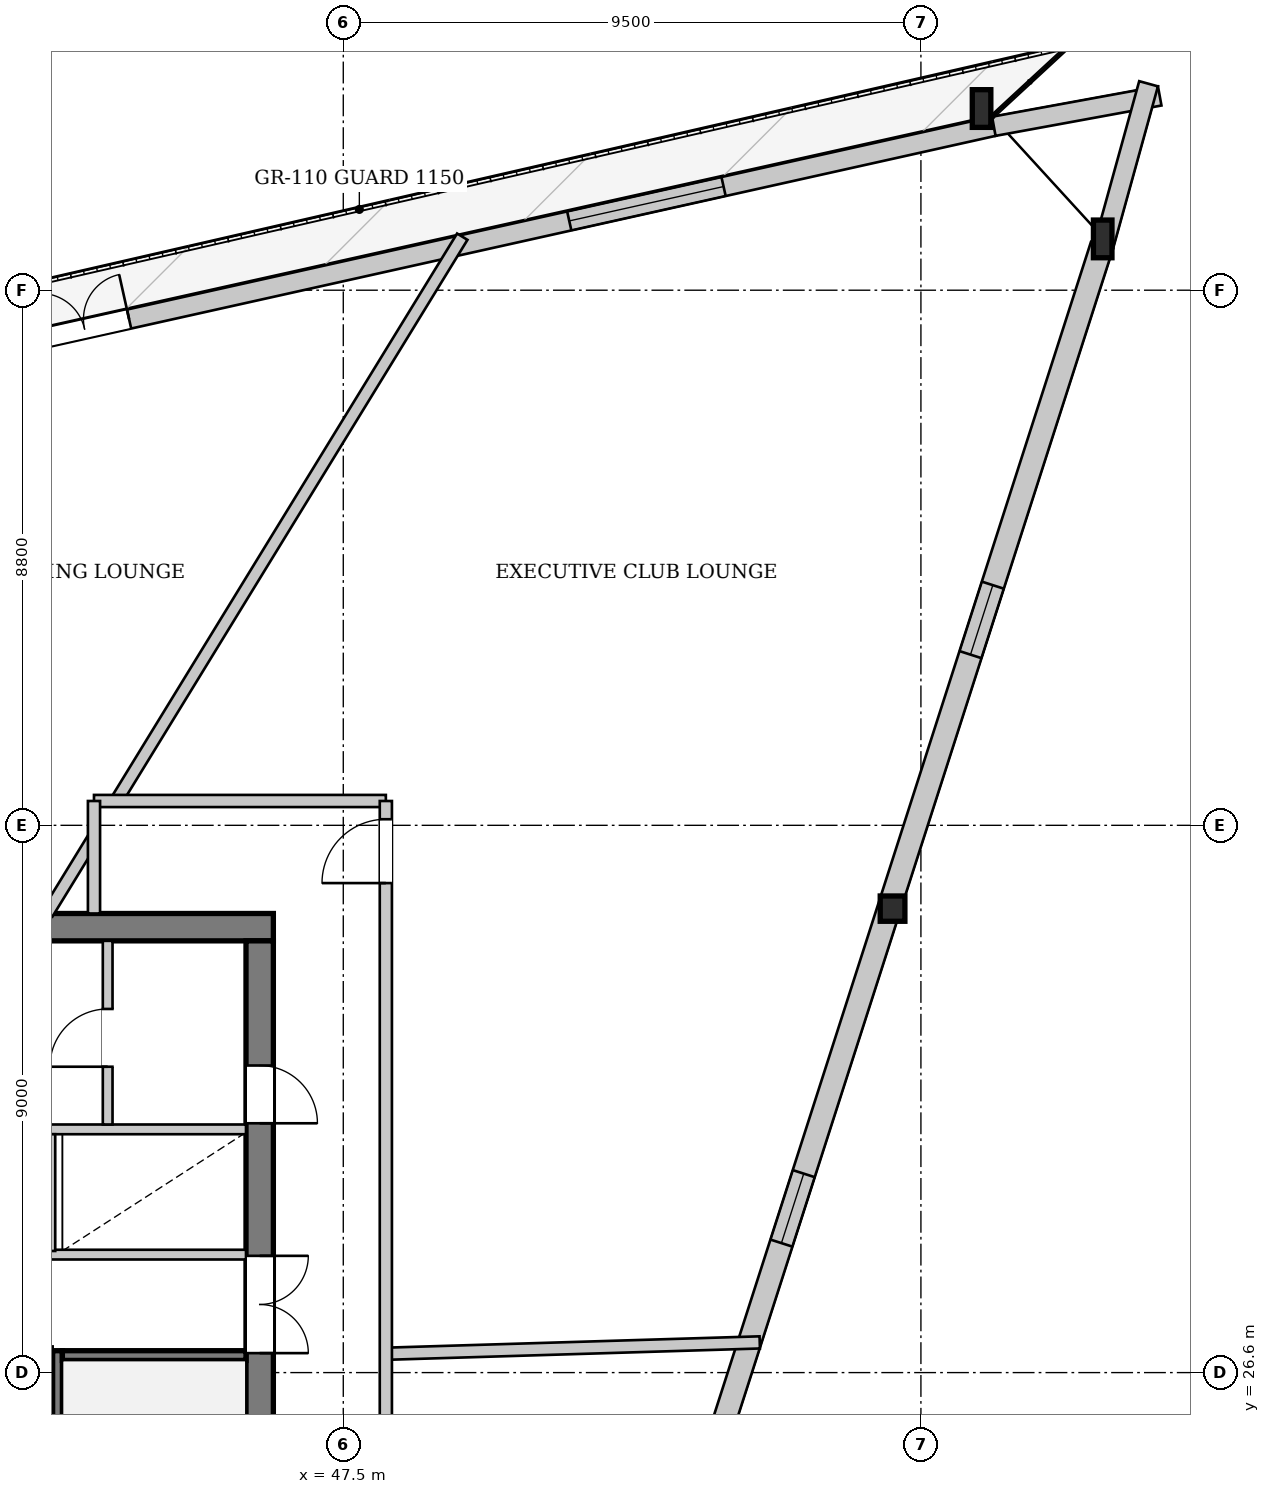
"""IFC4 building model, lengths in metres.
Left out: names, types, materials, properties, quantities, classifications, styles, units other than length and angle.
Written with IfcOpenShell. Run it as: python <this file> out.ifc"""

import sys

from ifc_helpers import new_model, si_unit, direction, frame, frame_2d, origin, origin_2d, place, context, subcontext, project, spatial, rectangle, i_section, extrude, source, transform, mapped, element, fill, save


model = new_model("IFC4")
c1 = context("Model", 3, precision=1e-05, world=origin(), true_north=direction((0.0, 1.0)))
c2 = subcontext(c1, "Body", "Model", "MODEL_VIEW")
j1 = project(units=[si_unit("LENGTHUNIT", "METRE"), si_unit("PLANEANGLEUNIT", "RADIAN")], contexts=[c1])
p1 = place(None, origin())
s1 = spatial("IfcSite", under=j1, at=p1, CompositionType="ELEMENT")
p2 = place(p1, origin())
s2 = spatial("IfcBuilding", under=s1, at=p2, CompositionType="ELEMENT")
p3 = place(p2, frame((0.0, 0.0, 209.6)))
s3 = spatial("IfcBuildingStorey", under=s2, at=p3, CompositionType="ELEMENT", Elevation=209.6)
m1 = source(origin(), c2, "Body", "SweptSolid", [
    extrude(i_section(OverallWidth=0.305, OverallDepth=0.62, WebThickness=0.021, FlangeThickness=0.04, at=origin_2d()), origin(), (0.0, 0.0, 1.0), 3.418),
])
p4 = place(p3, frame((60.159, 45.079, 0.0), z_axis=(-0.098864511312, 0.096292891076, 0.990430960507), x_axis=(-0.69772854898, -0.716362249101, 0.0)))
e1 = element("IfcColumn", 1, at=p4, inside=s3, PredefinedType="COLUMN", context=c2, shape_type="MappedRepresentation", body=[
    mapped(m1, transform((0.0, 0.0, 0.0), x_axis=(1.0, 0.0, 0.0), y_axis=(0.0, 1.0, 0.0), z_axis=(0.0, 0.0, 1.0), scale=1.0)),
])
m2 = source(origin(), c2, "Body", "SweptSolid", [
    extrude(i_section(OverallWidth=0.305, OverallDepth=0.62, WebThickness=0.021, FlangeThickness=0.04, at=origin_2d()), origin(), (0.0, 0.0, 1.0), 3.413),
])
p5 = place(p3, frame((58.17, 47.253, 0.0), z_axis=(-0.101281359539, 0.07903665416, 0.991713312157), x_axis=(-0.615211782312, -0.78836188575, 0.0)))
e2 = element("IfcColumn", 2, at=p5, inside=s3, PredefinedType="COLUMN", context=c2, shape_type="MappedRepresentation", body=[
    mapped(m2, transform((0.0, 0.0, 0.0), x_axis=(1.0, 0.0, 0.0), y_axis=(0.0, 1.0, 0.0), z_axis=(0.0, 0.0, 1.0), scale=1.0)),
])
m3 = source(origin(), c2, "Body", "SweptSolid", [
    extrude(i_section(OverallWidth=0.406, OverallDepth=0.416, WebThickness=0.027, FlangeThickness=0.042, at=origin_2d()), origin(), (0.0, 0.0, 1.0), 3.403),
])
p6 = place(p3, frame((56.625, 34.082, 0.0), z_axis=(-0.053880341029, 0.087098181103, 0.994741582372), x_axis=(-0.85042932519, -0.526089310723, 0.0)))
e3 = element("IfcColumn", 3, at=p6, inside=s3, PredefinedType="COLUMN", context=c2, shape_type="MappedRepresentation", body=[
    mapped(m3, transform((0.0, 0.0, 0.0), x_axis=(1.0, 0.0, 0.0), y_axis=(0.0, 1.0, 0.0), z_axis=(0.0, 0.0, 1.0), scale=1.0)),
])
p7 = place(p3, frame((36.205, 42.193, 0.0), z_axis=(0.0, 0.0, 1.0), x_axis=(0.976051796761, 0.217538249599, 0.0)))
e4 = element("IfcWall", 4, at=p7, inside=s3, PredefinedType="SOLIDWALL", context=c2, shape_type="SweptSolid", body=[
    extrude(rectangle(XDim=22.54, YDim=0.32, at=frame_2d((11.27, 0.0))), origin(), (0.0, 0.0, 1.0), 2.822),
])
p8 = place(p7, frame((6.463, 0.0, 0.0)))
e5 = element("IfcOpeningElement", 5, at=p8, cuts=e4, PredefinedType="OPENING", context=c2, shape_type="SweptSolid", body=[
    extrude(rectangle(XDim=1.5, YDim=2.3, at=frame_2d((0.75, 1.15))), frame((0.0, 0.17, 0.0), z_axis=(0.0, -1.0, 0.0), x_axis=(1.0, 0.0, 0.0)), (0.0, 0.0, 1.0), 0.34),
])
p9 = place(p7, frame((15.38, 0.0, 0.352)))
e6 = element("IfcOpeningElement", 6, at=p9, cuts=e4, PredefinedType="OPENING", context=c2, shape_type="SweptSolid", body=[
    extrude(rectangle(XDim=2.6, YDim=2.35, at=frame_2d((1.3, 1.175))), frame((0.0, 0.17, 0.0), z_axis=(0.0, -1.0, 0.0), x_axis=(1.0, 0.0, 0.0)), (0.0, 0.0, 1.0), 0.34),
])
for number, where, z_axis, x_axis in (
    (7, (58.199, 47.096, 0.0), (0.0, 0.0, 1.0), (0.984, 0.18, 0.0)),
    (8, (60.744, 47.795, 0.0), (0.0, 0.0, 1.0), (-0.267, -0.964, 0.0)),
):
    element("IfcWall", number, at=place(p3, frame(where, z_axis=z_axis, x_axis=x_axis)), inside=s3, PredefinedType="SOLIDWALL", context=c2, shape_type="SweptSolid", body=[
        extrude(rectangle(XDim=2.774, YDim=0.32, at=frame_2d((1.387, 0.0))), origin(), (0.0, 0.0, 1.0), 2.822),
    ])
p10 = place(p3, frame((59.978, 45.137, 0.0), z_axis=(0.0, 0.0, 1.0), x_axis=(-0.305908606636, -0.95206088271, 0.0)))
e9 = element("IfcWall", 9, at=p10, inside=s3, PredefinedType="SOLIDWALL", context=c2, shape_type="SweptSolid", body=[
    extrude(rectangle(XDim=23.102, YDim=0.38, at=frame_2d((11.551, 0.0))), origin(), (0.0, 0.0, 1.0), 2.822),
])
p11 = place(p10, frame((5.869, 0.0, 0.65)))
e10 = element("IfcOpeningElement", 10, at=p11, cuts=e9, PredefinedType="OPENING", context=c2, shape_type="SweptSolid", body=[
    extrude(rectangle(XDim=1.2, YDim=1.5, at=frame_2d((0.6, 0.75))), frame((0.0, 0.2, 0.0), z_axis=(0.0, -1.0, 0.0), x_axis=(1.0, 0.0, 0.0)), (0.0, 0.0, 1.0), 0.4),
])
p12 = place(p10, frame((16.034, 0.0, 0.65)))
e11 = element("IfcOpeningElement", 11, at=p12, cuts=e9, PredefinedType="OPENING", context=c2, shape_type="SweptSolid", body=[
    extrude(rectangle(XDim=1.2, YDim=1.5, at=frame_2d((0.6, 0.75))), frame((0.0, 0.2, 0.0), z_axis=(0.0, -1.0, 0.0), x_axis=(1.0, 0.0, 0.0)), (0.0, 0.0, 1.0), 0.4),
])
p13 = place(p3, frame((29.65, 33.925, 0.0), z_axis=(0.0, 0.0, 1.0), x_axis=(1.0, 0.0, 0.0)))
e12 = element("IfcWall", 12, at=p13, inside=s3, PredefinedType="SHEAR", context=c2, shape_type="SweptSolid", body=[
    extrude(rectangle(XDim=16.7, YDim=0.45, at=frame_2d((8.35, 0.0))), origin(), (0.0, 0.0, 1.0), 3.33),
])
p14 = place(p13, frame((1.45, 0.0, 0.0)))
e13 = element("IfcOpeningElement", 13, at=p14, cuts=e12, PredefinedType="OPENING", context=c2, shape_type="SweptSolid", body=[
    extrude(rectangle(XDim=0.95, YDim=2.1, at=frame_2d((0.475, 1.05))), frame((0.0, 0.235, 0.0), z_axis=(0.0, -1.0, 0.0), x_axis=(1.0, 0.0, 0.0)), (0.0, 0.0, 1.0), 0.47),
])
p15 = place(p13, frame((3.83, 0.0, 0.0)))
e14 = element("IfcOpeningElement", 14, at=p15, cuts=e12, PredefinedType="OPENING", context=c2, shape_type="SweptSolid", body=[
    extrude(rectangle(XDim=1.32, YDim=2.2, at=frame_2d((0.66, 1.1))), frame((0.0, 0.235, 0.0), z_axis=(0.0, -1.0, 0.0), x_axis=(1.0, 0.0, 0.0)), (0.0, 0.0, 1.0), 0.47),
])
p16 = place(p3, frame((46.125, 33.7, 0.0), z_axis=(0.0, 0.0, 1.0), x_axis=(0.0, -1.0, 0.0)))
e15 = element("IfcWall", 15, at=p16, inside=s3, PredefinedType="SHEAR", context=c2, shape_type="SweptSolid", body=[
    extrude(rectangle(XDim=14.2, YDim=0.45, at=frame_2d((7.1, 0.0))), origin(), (0.0, 0.0, 1.0), 3.33),
])
p17 = place(p16, frame((5.18, 0.0, 0.0)))
e16 = element("IfcOpeningElement", 16, at=p17, cuts=e15, PredefinedType="OPENING", context=c2, shape_type="SweptSolid", body=[
    extrude(rectangle(XDim=1.6, YDim=2.2, at=frame_2d((0.8, 1.1))), frame((0.0, 0.235, 0.0), z_axis=(0.0, -1.0, 0.0), x_axis=(1.0, 0.0, 0.0)), (0.0, 0.0, 1.0), 0.47),
])
p18 = place(p16, frame((2.05, 0.0, 0.0)))
e17 = element("IfcOpeningElement", 17, at=p18, cuts=e15, PredefinedType="OPENING", context=c2, shape_type="SweptSolid", body=[
    extrude(rectangle(XDim=0.95, YDim=2.1, at=frame_2d((0.475, 1.05))), frame((0.0, 0.235, 0.0), z_axis=(0.0, -1.0, 0.0), x_axis=(1.0, 0.0, 0.0)), (0.0, 0.0, 1.0), 0.47),
])
p19 = place(p3, frame((42.8, 26.96, 0.0), z_axis=(0.0, 0.0, 1.0), x_axis=(0.0, -1.0, 0.0)))
e18 = element("IfcWall", 18, at=p19, inside=s3, PredefinedType="PARTITIONING", context=c2, shape_type="SweptSolid", body=[
    extrude(rectangle(XDim=7.46, YDim=0.16, at=frame_2d((3.73, 0.0))), origin(), (0.0, 0.0, 1.0), 3.33),
])
p20 = place(p19, frame((6.06, 0.0, 0.0)))
e19 = element("IfcOpeningElement", 19, at=p20, cuts=e18, PredefinedType="OPENING", context=c2, shape_type="SweptSolid", body=[
    extrude(rectangle(XDim=1.32, YDim=2.2, at=frame_2d((0.66, 1.1))), frame((0.0, 0.09, 0.0), z_axis=(0.0, -1.0, 0.0), x_axis=(1.0, 0.0, 0.0)), (0.0, 0.0, 1.0), 0.18),
])
p21 = place(p3, frame((42.88, 26.88, 0.0), z_axis=(0.0, 0.0, 1.0), x_axis=(1.0, 0.0, 0.0)))
e20 = element("IfcWall", 20, at=p21, inside=s3, PredefinedType="PARTITIONING", context=c2, shape_type="SweptSolid", body=[
    extrude(rectangle(XDim=3.02, YDim=0.16, at=frame_2d((1.51, 0.0))), origin(), (0.0, 0.0, 1.0), 3.33),
])
p22 = place(p3, frame((33.28, 26.95, 0.0), z_axis=(0.0, 0.0, 1.0), x_axis=(1.0, 0.0, 0.0)))
e21 = element("IfcWall", 21, at=p22, inside=s3, PredefinedType="PARTITIONING", context=c2, shape_type="SweptSolid", body=[
    extrude(rectangle(XDim=9.44, YDim=0.16, at=frame_2d((4.72, 0.0))), origin(), (0.0, 0.0, 1.0), 3.33),
])
p23 = place(p22, frame((1.2, 0.0, 0.0)))
e22 = element("IfcOpeningElement", 22, at=p23, cuts=e21, PredefinedType="OPENING", context=c2, shape_type="SweptSolid", body=[
    extrude(rectangle(XDim=0.95, YDim=2.1, at=frame_2d((0.475, 1.05))), frame((0.0, 0.09, 0.0), z_axis=(0.0, -1.0, 0.0), x_axis=(1.0, 0.0, 0.0)), (0.0, 0.0, 1.0), 0.18),
])
p24 = place(p22, frame((4.65, 0.0, 0.0)))
e23 = element("IfcOpeningElement", 23, at=p24, cuts=e21, PredefinedType="OPENING", context=c2, shape_type="SweptSolid", body=[
    extrude(rectangle(XDim=0.95, YDim=2.1, at=frame_2d((0.475, 1.05))), frame((0.0, 0.09, 0.0), z_axis=(0.0, -1.0, 0.0), x_axis=(1.0, 0.0, 0.0)), (0.0, 0.0, 1.0), 0.18),
])
p25 = place(p22, frame((7.67, 0.0, 0.0)))
e24 = element("IfcOpeningElement", 24, at=p25, cuts=e21, PredefinedType="OPENING", context=c2, shape_type="SweptSolid", body=[
    extrude(rectangle(XDim=1.1, YDim=2.2, at=frame_2d((0.55, 1.1))), frame((0.0, 0.09, 0.0), z_axis=(0.0, -1.0, 0.0), x_axis=(1.0, 0.0, 0.0)), (0.0, 0.0, 1.0), 0.18),
])
p26 = place(p3, frame((33.28, 28.54, 0.0), z_axis=(0.0, 0.0, 1.0), x_axis=(1.0, 0.0, 0.0)))
e25 = element("IfcWall", 25, at=p26, inside=s3, PredefinedType="PARTITIONING", context=c2, shape_type="SweptSolid", body=[
    extrude(rectangle(XDim=12.62, YDim=0.16, at=frame_2d((6.31, 0.0))), origin(), (0.0, 0.0, 1.0), 3.33),
])
p27 = place(p26, frame((0.26, 0.0, 0.0)))
e26 = element("IfcOpeningElement", 26, at=p27, cuts=e25, PredefinedType="OPENING", context=c2, shape_type="SweptSolid", body=[
    extrude(rectangle(XDim=1.1, YDim=2.2, at=frame_2d((0.55, 1.1))), frame((0.0, 0.09, 0.0), z_axis=(0.0, -1.0, 0.0), x_axis=(1.0, 0.0, 0.0)), (0.0, 0.0, 1.0), 0.18),
])
p28 = place(p26, frame((2.01, 0.0, 0.0)))
e27 = element("IfcOpeningElement", 27, at=p28, cuts=e25, PredefinedType="OPENING", context=c2, shape_type="SweptSolid", body=[
    extrude(rectangle(XDim=1.1, YDim=2.2, at=frame_2d((0.55, 1.1))), frame((0.0, 0.09, 0.0), z_axis=(0.0, -1.0, 0.0), x_axis=(1.0, 0.0, 0.0)), (0.0, 0.0, 1.0), 0.18),
])
p29 = place(p26, frame((3.76, 0.0, 0.0)))
e28 = element("IfcOpeningElement", 28, at=p29, cuts=e25, PredefinedType="OPENING", context=c2, shape_type="SweptSolid", body=[
    extrude(rectangle(XDim=1.1, YDim=2.2, at=frame_2d((0.55, 1.1))), frame((0.0, 0.09, 0.0), z_axis=(0.0, -1.0, 0.0), x_axis=(1.0, 0.0, 0.0)), (0.0, 0.0, 1.0), 0.18),
])
p30 = place(p3, frame((40.72, 30.6, 0.0), z_axis=(0.0, 0.0, 1.0), x_axis=(1.0, 0.0, 0.0)))
e29 = element("IfcWall", 29, at=p30, inside=s3, PredefinedType="PARTITIONING", context=c2, shape_type="SweptSolid", body=[
    extrude(rectangle(XDim=5.18, YDim=0.16, at=frame_2d((2.59, 0.0))), origin(), (0.0, 0.0, 1.0), 3.33),
])
p31 = place(p3, frame((42.7, 28.6, 0.0), z_axis=(0.0, 0.0, 1.0), x_axis=(0.0, 1.0, 0.0)))
e30 = element("IfcWall", 30, at=p31, inside=s3, PredefinedType="PARTITIONING", context=c2, shape_type="SweptSolid", body=[
    extrude(rectangle(XDim=1.92, YDim=0.125, at=frame_2d((0.96, 0.0))), origin(), (0.0, 0.0, 1.0), 3.33),
])
p32 = place(p3, frame((43.625, 30.68, 0.0), z_axis=(0.0, 0.0, 1.0), x_axis=(0.0, 1.0, 0.0)))
e31 = element("IfcWall", 31, at=p32, inside=s3, PredefinedType="PARTITIONING", context=c2, shape_type="SweptSolid", body=[
    extrude(rectangle(XDim=3.02, YDim=0.16, at=frame_2d((1.51, 0.0))), origin(), (0.0, 0.0, 1.0), 3.33),
])
p33 = place(p32, frame((0.95, 0.0, 0.0)))
e32 = element("IfcOpeningElement", 32, at=p33, cuts=e31, PredefinedType="OPENING", context=c2, shape_type="SweptSolid", body=[
    extrude(rectangle(XDim=0.95, YDim=2.1, at=frame_2d((0.475, 1.05))), frame((0.0, 0.09, 0.0), z_axis=(0.0, -1.0, 0.0), x_axis=(1.0, 0.0, 0.0)), (0.0, 0.0, 1.0), 0.18),
])
p34 = place(p3, frame((48.2, 26.91, 0.0), z_axis=(0.0, 0.0, 1.0), x_axis=(0.999539065052, 0.030358811481, 0.0)))
e33 = element("IfcWall", 33, at=p34, inside=s3, PredefinedType="PARTITIONING", context=c2, shape_type="SweptSolid", body=[
    extrude(rectangle(XDim=6.152, YDim=0.2, at=frame_2d((3.076, 0.0))), origin(), (0.0, 0.0, 1.0), 3.33),
])
p35 = place(p3, frame((42.631, 34.15, 0.0), z_axis=(0.0, 0.0, 1.0), x_axis=(0.522717649011, 0.852505870603, 0.0)))
e34 = element("IfcWall", 34, at=p35, inside=s3, PredefinedType="PARTITIONING", context=c2, shape_type="SweptSolid", body=[
    extrude(rectangle(XDim=1.472, YDim=0.2, at=frame_2d((0.736, 0.0))), origin(), (0.0, 0.0, 1.0), 3.33),
])
p36 = place(p3, frame((43.765, 36.0, 0.0), z_axis=(0.0, 0.0, 1.0), x_axis=(0.522828119017, 0.852438125593, 0.0)))
e35 = element("IfcWall", 35, at=p36, inside=s3, PredefinedType="PARTITIONING", context=c2, shape_type="SweptSolid", body=[
    extrude(rectangle(XDim=10.887, YDim=0.2, at=frame_2d((5.443, 0.0))), origin(), (0.0, 0.0, 1.0), 3.33),
])
p37 = place(p3, frame((43.4, 36.0, 0.0), z_axis=(0.0, 0.0, 1.0), x_axis=(1.0, 0.0, 0.0)))
e36 = element("IfcWall", 36, at=p37, inside=s3, PredefinedType="PARTITIONING", context=c2, shape_type="SweptSolid", body=[
    extrude(rectangle(XDim=4.8, YDim=0.2, at=frame_2d((2.4, 0.0))), origin(), (0.0, 0.0, 1.0), 3.33),
])
p38 = place(p3, frame((43.4, 34.15, 0.0), z_axis=(0.0, 0.0, 1.0), x_axis=(0.0, 1.0, 0.0)))
e37 = element("IfcWall", 37, at=p38, inside=s3, PredefinedType="PARTITIONING", context=c2, shape_type="SweptSolid", body=[
    extrude(rectangle(XDim=1.85, YDim=0.2, at=frame_2d((0.925, 0.0))), origin(), (0.0, 0.0, 1.0), 3.33),
])
p39 = place(p3, frame((48.2, 17.2, 0.0), z_axis=(0.0, 0.0, 1.0), x_axis=(0.0, 1.0, 0.0)))
e38 = element("IfcWall", 38, at=p39, inside=s3, PredefinedType="PARTITIONING", context=c2, shape_type="SweptSolid", body=[
    extrude(rectangle(XDim=18.8, YDim=0.2, at=frame_2d((9.4, 0.0))), origin(), (0.0, 0.0, 1.0), 3.33),
])
p40 = place(p39, frame((17.45, 0.0, 0.0)))
e39 = element("IfcOpeningElement", 39, at=p40, cuts=e38, PredefinedType="OPENING", context=c2, shape_type="SweptSolid", body=[
    extrude(rectangle(XDim=1.05, YDim=2.2, at=frame_2d((0.525, 1.1))), frame((0.0, 0.11, 0.0), z_axis=(0.0, -1.0, 0.0), x_axis=(1.0, 0.0, 0.0)), (0.0, 0.0, 1.0), 0.22),
])
m4 = source(origin(), c2, "Body", "SweptSolid", [
    extrude(rectangle(XDim=1.5, YDim=2.3, at=frame_2d((0.75, 1.15))), frame((0.0, 0.025, 0.0), z_axis=(0.0, -1.0, 0.0), x_axis=(1.0, 0.0, 0.0)), (0.0, 0.0, 1.0), 0.05),
])
p41 = place(p8, origin())
e40 = element("IfcDoor", 40, at=p41, inside=s3, OperationType="DOUBLE_DOOR_SINGLE_SWING", PredefinedType="DOOR", context=c2, shape_type="MappedRepresentation", body=[
    mapped(m4, transform((0.0, 0.0, 0.0), x_axis=(1.0, 0.0, 0.0), y_axis=(0.0, 1.0, 0.0), z_axis=(0.0, 0.0, 1.0), scale=1.0)),
])
fill(e5, e40)
m5 = source(origin(), c2, "Body", "SweptSolid", [
    extrude(rectangle(XDim=2.6, YDim=2.35, at=frame_2d((1.3, 1.175))), frame((0.0, 0.03, 0.0), z_axis=(0.0, -1.0, 0.0), x_axis=(1.0, 0.0, 0.0)), (0.0, 0.0, 1.0), 0.06),
])
p42 = place(p9, origin())
e41 = element("IfcWindow", 41, at=p42, inside=s3, PartitioningType="SINGLE_PANEL", PredefinedType="WINDOW", context=c2, shape_type="MappedRepresentation", body=[
    mapped(m5, transform((0.0, 0.0, 0.0), x_axis=(1.0, 0.0, 0.0), y_axis=(0.0, 1.0, 0.0), z_axis=(0.0, 0.0, 1.0), scale=1.0)),
])
fill(e6, e41)
m6 = source(origin(), c2, "Body", "SweptSolid", [
    extrude(rectangle(XDim=1.2, YDim=1.5, at=frame_2d((0.6, 0.75))), frame((0.0, 0.03, 0.0), z_axis=(0.0, -1.0, 0.0), x_axis=(1.0, 0.0, 0.0)), (0.0, 0.0, 1.0), 0.06),
])
p43 = place(p11, origin())
e42 = element("IfcWindow", 42, at=p43, inside=s3, PartitioningType="SINGLE_PANEL", PredefinedType="WINDOW", context=c2, shape_type="MappedRepresentation", body=[
    mapped(m6, transform((0.0, 0.0, 0.0), x_axis=(1.0, 0.0, 0.0), y_axis=(0.0, 1.0, 0.0), z_axis=(0.0, 0.0, 1.0), scale=1.0)),
])
fill(e10, e42)
p44 = place(p12, origin())
e43 = element("IfcWindow", 43, at=p44, inside=s3, PartitioningType="SINGLE_PANEL", PredefinedType="WINDOW", context=c2, shape_type="MappedRepresentation", body=[
    mapped(m6, transform((0.0, 0.0, 0.0), x_axis=(1.0, 0.0, 0.0), y_axis=(0.0, 1.0, 0.0), z_axis=(0.0, 0.0, 1.0), scale=1.0)),
])
fill(e11, e43)
m7 = source(origin(), c2, "Body", "SweptSolid", [
    extrude(rectangle(XDim=1.6, YDim=2.2, at=frame_2d((0.8, 1.1))), frame((0.0, 0.025, 0.0), z_axis=(0.0, -1.0, 0.0), x_axis=(1.0, 0.0, 0.0)), (0.0, 0.0, 1.0), 0.05),
])
p45 = place(p17, origin())
e44 = element("IfcDoor", 44, at=p45, inside=s3, OperationType="DOUBLE_DOOR_SINGLE_SWING", PredefinedType="DOOR", context=c2, shape_type="MappedRepresentation", body=[
    mapped(m7, transform((0.0, 0.0, 0.0), x_axis=(1.0, 0.0, 0.0), y_axis=(0.0, 1.0, 0.0), z_axis=(0.0, 0.0, 1.0), scale=1.0)),
])
fill(e16, e44)
m8 = source(origin(), c2, "Body", "SweptSolid", [
    extrude(rectangle(XDim=0.95, YDim=2.1, at=frame_2d((0.475, 1.05))), frame((0.0, 0.025, 0.0), z_axis=(0.0, -1.0, 0.0), x_axis=(1.0, 0.0, 0.0)), (0.0, 0.0, 1.0), 0.05),
])
p46 = place(p33, origin())
e45 = element("IfcDoor", 45, at=p46, inside=s3, OperationType="SINGLE_SWING_LEFT", PredefinedType="DOOR", context=c2, shape_type="MappedRepresentation", body=[
    mapped(m8, transform((0.0, 0.0, 0.0), x_axis=(1.0, 0.0, 0.0), y_axis=(0.0, 1.0, 0.0), z_axis=(0.0, 0.0, 1.0), scale=1.0)),
])
fill(e32, e45)
p47 = place(p18, origin())
e46 = element("IfcDoor", 46, at=p47, inside=s3, OperationType="SINGLE_SWING_RIGHT", PredefinedType="DOOR", context=c2, shape_type="MappedRepresentation", body=[
    mapped(m8, transform((0.0, 0.0, 0.0), x_axis=(1.0, 0.0, 0.0), y_axis=(0.0, 1.0, 0.0), z_axis=(0.0, 0.0, 1.0), scale=1.0)),
])
fill(e17, e46)
m9 = source(origin(), c2, "Body", "SweptSolid", [
    extrude(rectangle(XDim=1.05, YDim=2.2, at=frame_2d((0.525, 1.1))), frame((0.0, 0.025, 0.0), z_axis=(0.0, -1.0, 0.0), x_axis=(1.0, 0.0, 0.0)), (0.0, 0.0, 1.0), 0.05),
])
p48 = place(p40, origin())
e47 = element("IfcDoor", 47, at=p48, inside=s3, OperationType="SINGLE_SWING_LEFT", PredefinedType="DOOR", context=c2, shape_type="MappedRepresentation", body=[
    mapped(m9, transform((0.0, 0.0, 0.0), x_axis=(1.0, 0.0, 0.0), y_axis=(0.0, 1.0, 0.0), z_axis=(0.0, 0.0, 1.0), scale=1.0)),
])
fill(e39, e47)
save(model, sys.argv[1])
